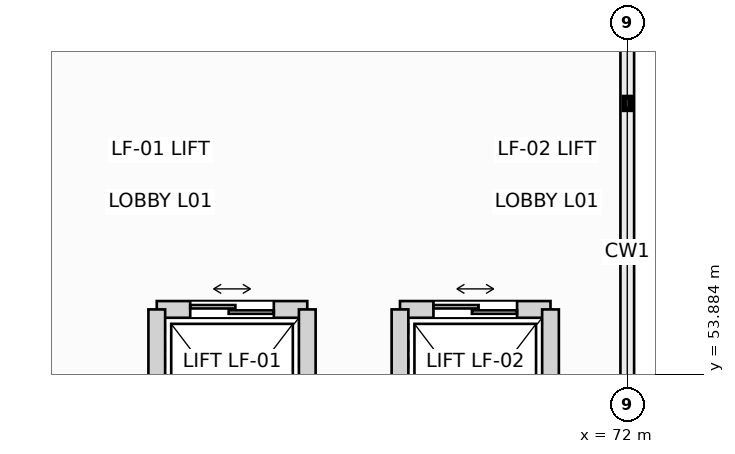
"""IFC4 building model, lengths in metres.
Left out: names, types, materials, properties, quantities, classifications, styles, units other than length and angle.
Written with IfcOpenShell. Run it as: python <this file> out.ifc"""

import sys

from ifc_helpers import new_model, si_unit, direction, frame, frame_2d, origin, place, context, subcontext, project, spatial, rectangle, extrude, element, fill, save


model = new_model("IFC4")
c1 = context("Model", 3, precision=1e-05, world=origin(), true_north=direction((0.0, 1.0)))
c2 = subcontext(c1, "Body", "Model", "MODEL_VIEW")
j1 = project(units=[si_unit("LENGTHUNIT", "METRE"), si_unit("PLANEANGLEUNIT", "RADIAN")], contexts=[c1])
p1 = place(None, origin())
s1 = spatial("IfcSite", under=j1, at=p1, CompositionType="ELEMENT")
p2 = place(p1, origin())
s2 = spatial("IfcBuilding", under=s1, at=p2, CompositionType="ELEMENT")
p3 = place(p2, frame((0.0, 0.0, 6.0)))
s3 = spatial("IfcBuildingStorey", under=s2, at=p3, CompositionType="ELEMENT", Elevation=6.0)
p4 = place(p3, frame((65.81, 54.74, 0.0), z_axis=(0.0, 0.0, 1.0), x_axis=(1.0, 0.0, 0.0)))
e1 = element("IfcWall", 1, at=p4, inside=s3, PredefinedType="PARTITIONING", context=c2, shape_type="SweptSolid", body=[
    extrude(rectangle(XDim=1.98, YDim=0.22, at=frame_2d((0.99, 0.0))), origin(), (0.0, 0.0, 1.0), 5.015),
])
p5 = place(p4, frame((0.44, 0.0, 0.0)))
e2 = element("IfcOpeningElement", 2, at=p5, cuts=e1, PredefinedType="OPENING", context=c2, shape_type="SweptSolid", body=[
    extrude(rectangle(XDim=1.1, YDim=2.18, at=frame_2d((0.55, 1.09))), frame((0.0, 0.12, 0.0), z_axis=(0.0, -1.0, 0.0), x_axis=(1.0, 0.0, 0.0)), (0.0, 0.0, 1.0), 0.24),
])
for number, where, z_axis, x_axis in (
    (3, (65.81, 52.26, 0.0), (0.0, 0.0, 1.0), (0.0, 1.0, 0.0)),
    (4, (67.79, 52.26, 0.0), (0.0, 0.0, 1.0), (0.0, 1.0, 0.0)),
):
    element("IfcWall", number, at=place(p3, frame(where, z_axis=z_axis, x_axis=x_axis)), inside=s3, PredefinedType="PARTITIONING", context=c2, shape_type="SweptSolid", body=[
        extrude(rectangle(XDim=2.48, YDim=0.22, at=frame_2d((1.24, 0.0))), origin(), (0.0, 0.0, 1.0), 5.015),
    ])
p6 = place(p3, frame((69.01, 54.74, 0.0), z_axis=(0.0, 0.0, 1.0), x_axis=(1.0, 0.0, 0.0)))
e5 = element("IfcWall", 5, at=p6, inside=s3, PredefinedType="PARTITIONING", context=c2, shape_type="SweptSolid", body=[
    extrude(rectangle(XDim=1.98, YDim=0.22, at=frame_2d((0.99, 0.0))), origin(), (0.0, 0.0, 1.0), 5.015),
])
p7 = place(p6, frame((0.44, 0.0, 0.0)))
e6 = element("IfcOpeningElement", 6, at=p7, cuts=e5, PredefinedType="OPENING", context=c2, shape_type="SweptSolid", body=[
    extrude(rectangle(XDim=1.1, YDim=2.18, at=frame_2d((0.55, 1.09))), frame((0.0, 0.12, 0.0), z_axis=(0.0, -1.0, 0.0), x_axis=(1.0, 0.0, 0.0)), (0.0, 0.0, 1.0), 0.24),
])
for number, where, z_axis, x_axis in (
    (7, (69.01, 52.26, 0.0), (0.0, 0.0, 1.0), (0.0, 1.0, 0.0)),
    (8, (70.99, 52.26, 0.0), (0.0, 0.0, 1.0), (0.0, 1.0, 0.0)),
):
    element("IfcWall", number, at=place(p3, frame(where, z_axis=z_axis, x_axis=x_axis)), inside=s3, PredefinedType="PARTITIONING", context=c2, shape_type="SweptSolid", body=[
        extrude(rectangle(XDim=2.48, YDim=0.22, at=frame_2d((1.24, 0.0))), origin(), (0.0, 0.0, 1.0), 5.015),
    ])
p8 = place(p5, origin())
e9 = element("IfcDoor", 9, at=p8, inside=s3, OperationType="DOUBLE_DOOR_SLIDING", PredefinedType="DOOR", context=c2, shape_type="SweptSolid", body=[
    extrude(rectangle(XDim=1.1, YDim=2.18, at=frame_2d((0.55, 1.09))), frame((0.0, 0.025, 0.0), z_axis=(0.0, -1.0, 0.0), x_axis=(1.0, 0.0, 0.0)), (0.0, 0.0, 1.0), 0.05),
])
fill(e2, e9)
p9 = place(p7, origin())
e10 = element("IfcDoor", 10, at=p9, inside=s3, OperationType="DOUBLE_DOOR_SLIDING", PredefinedType="DOOR", context=c2, shape_type="SweptSolid", body=[
    extrude(rectangle(XDim=1.1, YDim=2.18, at=frame_2d((0.55, 1.09))), frame((0.0, 0.025, 0.0), z_axis=(0.0, -1.0, 0.0), x_axis=(1.0, 0.0, 0.0)), (0.0, 0.0, 1.0), 0.05),
])
fill(e6, e10)
save(model, sys.argv[1])
